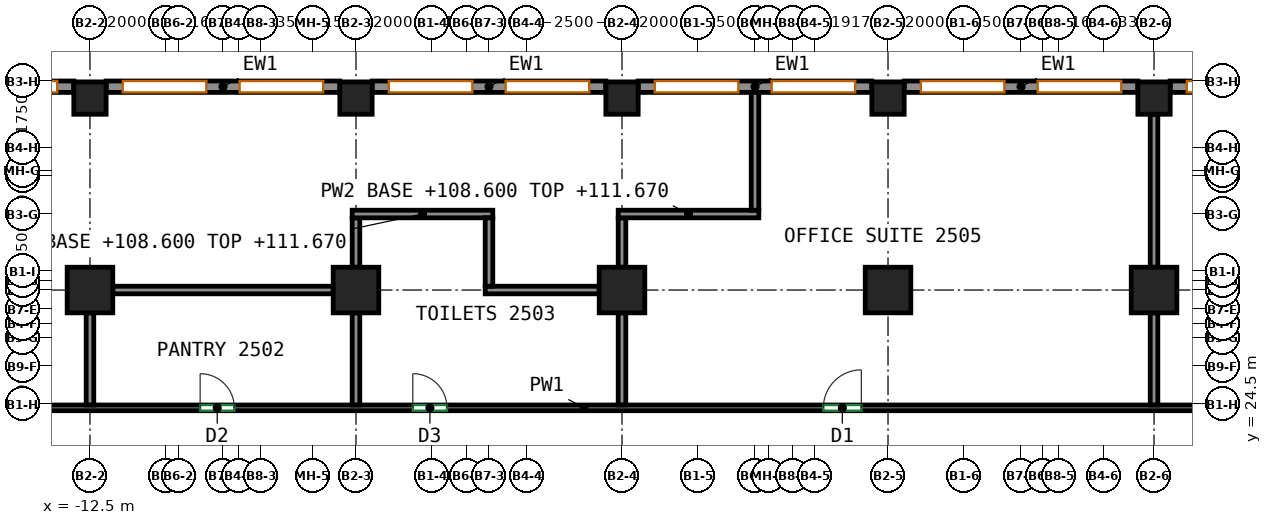
"""IFC4 building model, lengths in metres.
Left out: names, types, materials, properties, quantities, classifications, styles, units other than length and angle.
Written with IfcOpenShell. Run it as: python <this file> out.ifc"""

import sys

from ifc_helpers import new_model, si_unit, direction, frame, frame_2d, origin, origin_2d, place, context, subcontext, project, spatial, rectangle, extrude, source, transform, mapped, element, fill, save


model = new_model("IFC4")
c1 = context("Model", 3, precision=1e-05, world=origin(), true_north=direction((0.0, 1.0)))
c2 = subcontext(c1, "Body", "Model", "MODEL_VIEW")
j1 = project(units=[si_unit("LENGTHUNIT", "METRE"), si_unit("PLANEANGLEUNIT", "RADIAN")], contexts=[c1])
p1 = place(None, origin())
s1 = spatial("IfcSite", under=j1, at=p1, CompositionType="ELEMENT")
p2 = place(p1, origin())
s2 = spatial("IfcBuilding", under=s1, at=p2, CompositionType="ELEMENT")
p3 = place(p2, frame((0.0, 0.0, 108.6)))
s3 = spatial("IfcBuildingStorey", under=s2, at=p3, CompositionType="ELEMENT", Elevation=108.6)
m1 = source(origin(), c2, "Body", "SweptSolid", [
    extrude(rectangle(XDim=1.2, YDim=1.2, at=origin_2d()), origin(), (0.0, 0.0, 1.0), 3.72),
])
p4 = place(p3, frame((-12.5, 27.5, 0.0), z_axis=(0.0, 0.0, 1.0), x_axis=(1.0, 0.0, 0.0)))
e1 = element("IfcColumn", 1, at=p4, inside=s3, PredefinedType="COLUMN", context=c2, shape_type="MappedRepresentation", body=[
    mapped(m1, transform((0.0, 0.0, 0.0))),
])
m2 = source(origin(), c2, "Body", "SweptSolid", [
    extrude(rectangle(XDim=0.85, YDim=0.85, at=origin_2d()), origin(), (0.0, 0.0, 1.0), 3.72),
])
p5 = place(p3, frame((-12.5, 32.55, 0.0), z_axis=(0.0, 0.0, 1.0), x_axis=(1.0, 0.0, 0.0)))
e2 = element("IfcColumn", 2, at=p5, inside=s3, PredefinedType="COLUMN", context=c2, shape_type="MappedRepresentation", body=[
    mapped(m2, transform((0.0, 0.0, 0.0))),
])
p6 = place(p3, frame((-5.5, 27.5, 0.0), z_axis=(0.0, 0.0, 1.0), x_axis=(1.0, 0.0, 0.0)))
e3 = element("IfcColumn", 3, at=p6, inside=s3, PredefinedType="COLUMN", context=c2, shape_type="MappedRepresentation", body=[
    mapped(m1, transform((0.0, 0.0, 0.0))),
])
p7 = place(p3, frame((-5.5, 32.55, 0.0), z_axis=(0.0, 0.0, 1.0), x_axis=(1.0, 0.0, 0.0)))
e4 = element("IfcColumn", 4, at=p7, inside=s3, PredefinedType="COLUMN", context=c2, shape_type="MappedRepresentation", body=[
    mapped(m2, transform((0.0, 0.0, 0.0))),
])
p8 = place(p3, frame((1.5, 27.5, 0.0), z_axis=(0.0, 0.0, 1.0), x_axis=(1.0, 0.0, 0.0)))
e5 = element("IfcColumn", 5, at=p8, inside=s3, PredefinedType="COLUMN", context=c2, shape_type="MappedRepresentation", body=[
    mapped(m1, transform((0.0, 0.0, 0.0))),
])
p9 = place(p3, frame((1.5, 32.55, 0.0), z_axis=(0.0, 0.0, 1.0), x_axis=(1.0, 0.0, 0.0)))
e6 = element("IfcColumn", 6, at=p9, inside=s3, PredefinedType="COLUMN", context=c2, shape_type="MappedRepresentation", body=[
    mapped(m2, transform((0.0, 0.0, 0.0))),
])
p10 = place(p3, frame((8.5, 27.5, 0.0), z_axis=(0.0, 0.0, 1.0), x_axis=(1.0, 0.0, 0.0)))
e7 = element("IfcColumn", 7, at=p10, inside=s3, PredefinedType="COLUMN", context=c2, shape_type="MappedRepresentation", body=[
    mapped(m1, transform((0.0, 0.0, 0.0))),
])
p11 = place(p3, frame((8.5, 32.55, 0.0), z_axis=(0.0, 0.0, 1.0), x_axis=(1.0, 0.0, 0.0)))
e8 = element("IfcColumn", 8, at=p11, inside=s3, PredefinedType="COLUMN", context=c2, shape_type="MappedRepresentation", body=[
    mapped(m2, transform((0.0, 0.0, 0.0))),
])
p12 = place(p3, frame((15.5, 27.5, 0.0), z_axis=(0.0, 0.0, 1.0), x_axis=(1.0, 0.0, 0.0)))
e9 = element("IfcColumn", 9, at=p12, inside=s3, PredefinedType="COLUMN", context=c2, shape_type="MappedRepresentation", body=[
    mapped(m1, transform((0.0, 0.0, 0.0))),
])
p13 = place(p3, frame((15.5, 32.55, 0.0), z_axis=(0.0, 0.0, 1.0), x_axis=(1.0, 0.0, 0.0)))
e10 = element("IfcColumn", 10, at=p13, inside=s3, PredefinedType="COLUMN", context=c2, shape_type="MappedRepresentation", body=[
    mapped(m2, transform((0.0, 0.0, 0.0))),
])
m3 = source(origin(), c2, "Body", "SweptSolid", [
    extrude(rectangle(XDim=6.15, YDim=0.3, at=frame_2d((3.075, 0.0))), origin(), (0.0, 0.0, 1.0), 3.72),
])
p14 = place(p3, frame((22.075, 32.85, 0.0), z_axis=(0.0, 0.0, 1.0), x_axis=(-1.0, 0.0, 0.0)))
e11 = element("IfcWall", 11, at=p14, inside=s3, PredefinedType="SOLIDWALL", context=c2, shape_type="MappedRepresentation", body=[
    mapped(m3, transform((0.0, 0.0, 0.0))),
])
p15 = place(p14, frame((0.438, 0.0, 0.7)))
e12 = element("IfcOpeningElement", 12, at=p15, cuts=e11, PredefinedType="OPENING", context=c2, shape_type="SweptSolid", body=[
    extrude(rectangle(XDim=2.2, YDim=2.25, at=frame_2d((1.1, 1.125))), frame((0.0, 0.16, 0.0), z_axis=(0.0, -1.0, 0.0), x_axis=(1.0, 0.0, 0.0)), (0.0, 0.0, 1.0), 0.32),
])
p16 = place(p14, frame((3.512, 0.0, 0.7)))
e13 = element("IfcOpeningElement", 13, at=p16, cuts=e11, PredefinedType="OPENING", context=c2, shape_type="SweptSolid", body=[
    extrude(rectangle(XDim=2.2, YDim=2.25, at=frame_2d((1.1, 1.125))), frame((0.0, 0.16, 0.0), z_axis=(0.0, -1.0, 0.0), x_axis=(1.0, 0.0, 0.0)), (0.0, 0.0, 1.0), 0.32),
])
p17 = place(p3, frame((15.075, 32.85, 0.0), z_axis=(0.0, 0.0, 1.0), x_axis=(-1.0, 0.0, 0.0)))
e14 = element("IfcWall", 14, at=p17, inside=s3, PredefinedType="SOLIDWALL", context=c2, shape_type="MappedRepresentation", body=[
    mapped(m3, transform((0.0, 0.0, 0.0))),
])
p18 = place(p17, frame((0.438, 0.0, 0.7)))
e15 = element("IfcOpeningElement", 15, at=p18, cuts=e14, PredefinedType="OPENING", context=c2, shape_type="SweptSolid", body=[
    extrude(rectangle(XDim=2.2, YDim=2.25, at=frame_2d((1.1, 1.125))), frame((0.0, 0.16, 0.0), z_axis=(0.0, -1.0, 0.0), x_axis=(1.0, 0.0, 0.0)), (0.0, 0.0, 1.0), 0.32),
])
p19 = place(p17, frame((3.512, 0.0, 0.7)))
e16 = element("IfcOpeningElement", 16, at=p19, cuts=e14, PredefinedType="OPENING", context=c2, shape_type="SweptSolid", body=[
    extrude(rectangle(XDim=2.2, YDim=2.25, at=frame_2d((1.1, 1.125))), frame((0.0, 0.16, 0.0), z_axis=(0.0, -1.0, 0.0), x_axis=(1.0, 0.0, 0.0)), (0.0, 0.0, 1.0), 0.32),
])
p20 = place(p3, frame((8.075, 32.85, 0.0), z_axis=(0.0, 0.0, 1.0), x_axis=(-1.0, 0.0, 0.0)))
e17 = element("IfcWall", 17, at=p20, inside=s3, PredefinedType="SOLIDWALL", context=c2, shape_type="MappedRepresentation", body=[
    mapped(m3, transform((0.0, 0.0, 0.0))),
])
p21 = place(p20, frame((0.438, 0.0, 0.7)))
e18 = element("IfcOpeningElement", 18, at=p21, cuts=e17, PredefinedType="OPENING", context=c2, shape_type="SweptSolid", body=[
    extrude(rectangle(XDim=2.2, YDim=2.25, at=frame_2d((1.1, 1.125))), frame((0.0, 0.16, 0.0), z_axis=(0.0, -1.0, 0.0), x_axis=(1.0, 0.0, 0.0)), (0.0, 0.0, 1.0), 0.32),
])
p22 = place(p20, frame((3.512, 0.0, 0.7)))
e19 = element("IfcOpeningElement", 19, at=p22, cuts=e17, PredefinedType="OPENING", context=c2, shape_type="SweptSolid", body=[
    extrude(rectangle(XDim=2.2, YDim=2.25, at=frame_2d((1.1, 1.125))), frame((0.0, 0.16, 0.0), z_axis=(0.0, -1.0, 0.0), x_axis=(1.0, 0.0, 0.0)), (0.0, 0.0, 1.0), 0.32),
])
p23 = place(p3, frame((1.075, 32.85, 0.0), z_axis=(0.0, 0.0, 1.0), x_axis=(-1.0, 0.0, 0.0)))
e20 = element("IfcWall", 20, at=p23, inside=s3, PredefinedType="SOLIDWALL", context=c2, shape_type="MappedRepresentation", body=[
    mapped(m3, transform((0.0, 0.0, 0.0))),
])
p24 = place(p23, frame((0.438, 0.0, 0.7)))
e21 = element("IfcOpeningElement", 21, at=p24, cuts=e20, PredefinedType="OPENING", context=c2, shape_type="SweptSolid", body=[
    extrude(rectangle(XDim=2.2, YDim=2.25, at=frame_2d((1.1, 1.125))), frame((0.0, 0.16, 0.0), z_axis=(0.0, -1.0, 0.0), x_axis=(1.0, 0.0, 0.0)), (0.0, 0.0, 1.0), 0.32),
])
p25 = place(p23, frame((3.512, 0.0, 0.7)))
e22 = element("IfcOpeningElement", 22, at=p25, cuts=e20, PredefinedType="OPENING", context=c2, shape_type="SweptSolid", body=[
    extrude(rectangle(XDim=2.2, YDim=2.25, at=frame_2d((1.1, 1.125))), frame((0.0, 0.16, 0.0), z_axis=(0.0, -1.0, 0.0), x_axis=(1.0, 0.0, 0.0)), (0.0, 0.0, 1.0), 0.32),
])
p26 = place(p3, frame((-5.925, 32.85, 0.0), z_axis=(0.0, 0.0, 1.0), x_axis=(-1.0, 0.0, 0.0)))
e23 = element("IfcWall", 23, at=p26, inside=s3, PredefinedType="SOLIDWALL", context=c2, shape_type="MappedRepresentation", body=[
    mapped(m3, transform((0.0, 0.0, 0.0))),
])
p27 = place(p26, frame((0.438, 0.0, 0.7)))
e24 = element("IfcOpeningElement", 24, at=p27, cuts=e23, PredefinedType="OPENING", context=c2, shape_type="SweptSolid", body=[
    extrude(rectangle(XDim=2.2, YDim=2.25, at=frame_2d((1.1, 1.125))), frame((0.0, 0.16, 0.0), z_axis=(0.0, -1.0, 0.0), x_axis=(1.0, 0.0, 0.0)), (0.0, 0.0, 1.0), 0.32),
])
p28 = place(p26, frame((3.512, 0.0, 0.7)))
e25 = element("IfcOpeningElement", 25, at=p28, cuts=e23, PredefinedType="OPENING", context=c2, shape_type="SweptSolid", body=[
    extrude(rectangle(XDim=2.2, YDim=2.25, at=frame_2d((1.1, 1.125))), frame((0.0, 0.16, 0.0), z_axis=(0.0, -1.0, 0.0), x_axis=(1.0, 0.0, 0.0)), (0.0, 0.0, 1.0), 0.32),
])
p29 = place(p3, frame((-12.925, 32.85, 0.0), z_axis=(0.0, 0.0, 1.0), x_axis=(-1.0, 0.0, 0.0)))
e26 = element("IfcWall", 26, at=p29, inside=s3, PredefinedType="SOLIDWALL", context=c2, shape_type="MappedRepresentation", body=[
    mapped(m3, transform((0.0, 0.0, 0.0))),
])
p30 = place(p29, frame((0.438, 0.0, 0.7)))
e27 = element("IfcOpeningElement", 27, at=p30, cuts=e26, PredefinedType="OPENING", context=c2, shape_type="SweptSolid", body=[
    extrude(rectangle(XDim=2.2, YDim=2.25, at=frame_2d((1.1, 1.125))), frame((0.0, 0.16, 0.0), z_axis=(0.0, -1.0, 0.0), x_axis=(1.0, 0.0, 0.0)), (0.0, 0.0, 1.0), 0.32),
])
p31 = place(p29, frame((3.512, 0.0, 0.7)))
e28 = element("IfcOpeningElement", 28, at=p31, cuts=e26, PredefinedType="OPENING", context=c2, shape_type="SweptSolid", body=[
    extrude(rectangle(XDim=2.2, YDim=2.25, at=frame_2d((1.1, 1.125))), frame((0.0, 0.16, 0.0), z_axis=(0.0, -1.0, 0.0), x_axis=(1.0, 0.0, 0.0)), (0.0, 0.0, 1.0), 0.32),
])
p32 = place(p3, frame((-19.575, 24.4, 0.0), z_axis=(0.0, 0.0, 1.0), x_axis=(1.0, 0.0, 0.0)))
e29 = element("IfcWall", 29, at=p32, inside=s3, PredefinedType="PARTITIONING", context=c2, shape_type="SweptSolid", body=[
    extrude(rectangle(XDim=40.15, YDim=0.15, at=frame_2d((20.075, 0.0))), origin(), (0.0, 0.0, 1.0), 3.72),
])
p33 = place(p32, frame((9.974, 0.0, 0.0)))
e30 = element("IfcOpeningElement", 30, at=p33, cuts=e29, PredefinedType="OPENING", context=c2, shape_type="SweptSolid", body=[
    extrude(rectangle(XDim=0.9, YDim=2.1, at=frame_2d((0.45, 1.05))), frame((0.0, 0.085, 0.0), z_axis=(0.0, -1.0, 0.0), x_axis=(1.0, 0.0, 0.0)), (0.0, 0.0, 1.0), 0.17),
])
p34 = place(p32, frame((15.57, 0.0, 0.0)))
e31 = element("IfcOpeningElement", 31, at=p34, cuts=e29, PredefinedType="OPENING", context=c2, shape_type="SweptSolid", body=[
    extrude(rectangle(XDim=0.9, YDim=2.1, at=frame_2d((0.45, 1.05))), frame((0.0, 0.085, 0.0), z_axis=(0.0, -1.0, 0.0), x_axis=(1.0, 0.0, 0.0)), (0.0, 0.0, 1.0), 0.17),
])
p35 = place(p32, frame((26.373, 0.0, 0.0)))
e32 = element("IfcOpeningElement", 32, at=p35, cuts=e29, PredefinedType="OPENING", context=c2, shape_type="SweptSolid", body=[
    extrude(rectangle(XDim=1.0, YDim=2.1, at=frame_2d((0.5, 1.05))), frame((0.0, 0.085, 0.0), z_axis=(0.0, -1.0, 0.0), x_axis=(1.0, 0.0, 0.0)), (0.0, 0.0, 1.0), 0.17),
])
p36 = place(p32, frame((37.619, 0.0, 0.0)))
e33 = element("IfcOpeningElement", 33, at=p36, cuts=e29, PredefinedType="OPENING", context=c2, shape_type="SweptSolid", body=[
    extrude(rectangle(XDim=1.0, YDim=2.1, at=frame_2d((0.5, 1.05))), frame((0.0, 0.085, 0.0), z_axis=(0.0, -1.0, 0.0), x_axis=(1.0, 0.0, 0.0)), (0.0, 0.0, 1.0), 0.17),
])
p37 = place(p3, frame((15.5, 28.1, 0.0), z_axis=(0.0, 0.0, 1.0), x_axis=(0.0, 1.0, 0.0)))
e34 = element("IfcWall", 34, at=p37, inside=s3, PredefinedType="PARTITIONING", context=c2, shape_type="SweptSolid", body=[
    extrude(rectangle(XDim=4.025, YDim=0.2, at=frame_2d((2.012, 0.0))), origin(), (0.0, 0.0, 1.0), 3.72),
])
for number, where, z_axis, x_axis in (
    (35, (15.5, 24.476, 0.0), (0.0, 0.0, 1.0), (0.0, 1.0, 0.0)),
    (36, (1.5, 24.476, 0.0), (0.0, 0.0, 1.0), (0.0, 1.0, 0.0)),
):
    element("IfcWall", number, at=place(p3, frame(where, z_axis=z_axis, x_axis=x_axis)), inside=s3, PredefinedType="PARTITIONING", context=c2, shape_type="SweptSolid", body=[
        extrude(rectangle(XDim=2.424, YDim=0.2, at=frame_2d((1.212, 0.0))), origin(), (0.0, 0.0, 1.0), 3.72),
    ])
p38 = place(p3, frame((1.5, 28.1, 0.0), z_axis=(0.0, 0.0, 1.0), x_axis=(0.0, 1.0, 0.0)))
e37 = element("IfcWall", 37, at=p38, inside=s3, PredefinedType="PARTITIONING", context=c2, shape_type="SweptSolid", body=[
    extrude(rectangle(XDim=1.3, YDim=0.2, at=frame_2d((0.65, 0.0))), origin(), (0.0, 0.0, 1.0), 3.72),
])
p39 = place(p3, frame((1.4, 29.5, 0.0), z_axis=(0.0, 0.0, 1.0), x_axis=(1.0, 0.0, 0.0)))
e38 = element("IfcWall", 38, at=p39, inside=s3, PredefinedType="PARTITIONING", context=c2, shape_type="SweptSolid", body=[
    extrude(rectangle(XDim=3.7, YDim=0.2, at=frame_2d((1.85, 0.0))), origin(), (0.0, 0.0, 1.0), 3.07),
])
p40 = place(p3, frame((5.0, 29.6, 0.0), z_axis=(0.0, 0.0, 1.0), x_axis=(0.0, 1.0, 0.0)))
e39 = element("IfcWall", 39, at=p40, inside=s3, PredefinedType="PARTITIONING", context=c2, shape_type="SweptSolid", body=[
    extrude(rectangle(XDim=3.15, YDim=0.2, at=frame_2d((1.575, 0.0))), origin(), (0.0, 0.0, 1.0), 3.72),
])
p41 = place(p3, frame((-5.5, 24.476, 0.0), z_axis=(0.0, 0.0, 1.0), x_axis=(0.0, 1.0, 0.0)))
e40 = element("IfcWall", 40, at=p41, inside=s3, PredefinedType="PARTITIONING", context=c2, shape_type="SweptSolid", body=[
    extrude(rectangle(XDim=2.424, YDim=0.2, at=frame_2d((1.212, 0.0))), origin(), (0.0, 0.0, 1.0), 3.72),
])
p42 = place(p3, frame((-2.1, 27.5, 0.0), z_axis=(0.0, 0.0, 1.0), x_axis=(1.0, 0.0, 0.0)))
e41 = element("IfcWall", 41, at=p42, inside=s3, PredefinedType="PARTITIONING", context=c2, shape_type="SweptSolid", body=[
    extrude(rectangle(XDim=3.0, YDim=0.2, at=frame_2d((1.5, 0.0))), origin(), (0.0, 0.0, 1.0), 3.72),
])
p43 = place(p3, frame((-5.5, 28.1, 0.0), z_axis=(0.0, 0.0, 1.0), x_axis=(0.0, 1.0, 0.0)))
e42 = element("IfcWall", 42, at=p43, inside=s3, PredefinedType="PARTITIONING", context=c2, shape_type="SweptSolid", body=[
    extrude(rectangle(XDim=1.3, YDim=0.2, at=frame_2d((0.65, 0.0))), origin(), (0.0, 0.0, 1.0), 3.72),
])
p44 = place(p3, frame((-5.6, 29.5, 0.0), z_axis=(0.0, 0.0, 1.0), x_axis=(1.0, 0.0, 0.0)))
e43 = element("IfcWall", 43, at=p44, inside=s3, PredefinedType="PARTITIONING", context=c2, shape_type="SweptSolid", body=[
    extrude(rectangle(XDim=3.7, YDim=0.2, at=frame_2d((1.85, 0.0))), origin(), (0.0, 0.0, 1.0), 3.07),
])
p45 = place(p3, frame((-2.0, 27.6, 0.0), z_axis=(0.0, 0.0, 1.0), x_axis=(0.0, 1.0, 0.0)))
e44 = element("IfcWall", 44, at=p45, inside=s3, PredefinedType="PARTITIONING", context=c2, shape_type="SweptSolid", body=[
    extrude(rectangle(XDim=1.8, YDim=0.2, at=frame_2d((0.9, 0.0))), origin(), (0.0, 0.0, 1.0), 3.72),
])
p46 = place(p3, frame((-12.5, 26.9, 0.0), z_axis=(0.0, 0.0, 1.0), x_axis=(0.0, -1.0, 0.0)))
e45 = element("IfcWall", 45, at=p46, inside=s3, PredefinedType="PARTITIONING", context=c2, shape_type="SweptSolid", body=[
    extrude(rectangle(XDim=2.424, YDim=0.2, at=frame_2d((1.212, 0.0))), origin(), (0.0, 0.0, 1.0), 3.72),
])
p47 = place(p3, frame((-11.9, 27.5, 0.0), z_axis=(0.0, 0.0, 1.0), x_axis=(1.0, 0.0, 0.0)))
e46 = element("IfcWall", 46, at=p47, inside=s3, PredefinedType="PARTITIONING", context=c2, shape_type="SweptSolid", body=[
    extrude(rectangle(XDim=5.8, YDim=0.2, at=frame_2d((2.9, 0.0))), origin(), (0.0, 0.0, 1.0), 3.72),
])
p48 = place(p16, origin())
e47 = element("IfcWindow", 47, at=p48, inside=s3, PartitioningType="SINGLE_PANEL", PredefinedType="WINDOW", context=c2, shape_type="SweptSolid", body=[
    extrude(rectangle(XDim=2.2, YDim=2.25, at=frame_2d((1.1, 1.125))), frame((0.0, 0.03, 0.0), z_axis=(0.0, -1.0, 0.0), x_axis=(1.0, 0.0, 0.0)), (0.0, 0.0, 1.0), 0.06),
])
fill(e13, e47)
p49 = place(p18, origin())
e48 = element("IfcWindow", 48, at=p49, inside=s3, PartitioningType="SINGLE_PANEL", PredefinedType="WINDOW", context=c2, shape_type="SweptSolid", body=[
    extrude(rectangle(XDim=2.2, YDim=2.25, at=frame_2d((1.1, 1.125))), frame((0.0, 0.03, 0.0), z_axis=(0.0, -1.0, 0.0), x_axis=(1.0, 0.0, 0.0)), (0.0, 0.0, 1.0), 0.06),
])
fill(e15, e48)
p50 = place(p19, origin())
e49 = element("IfcWindow", 49, at=p50, inside=s3, PartitioningType="SINGLE_PANEL", PredefinedType="WINDOW", context=c2, shape_type="SweptSolid", body=[
    extrude(rectangle(XDim=2.2, YDim=2.25, at=frame_2d((1.1, 1.125))), frame((0.0, 0.03, 0.0), z_axis=(0.0, -1.0, 0.0), x_axis=(1.0, 0.0, 0.0)), (0.0, 0.0, 1.0), 0.06),
])
fill(e16, e49)
p51 = place(p21, origin())
e50 = element("IfcWindow", 50, at=p51, inside=s3, PartitioningType="SINGLE_PANEL", PredefinedType="WINDOW", context=c2, shape_type="SweptSolid", body=[
    extrude(rectangle(XDim=2.2, YDim=2.25, at=frame_2d((1.1, 1.125))), frame((0.0, 0.03, 0.0), z_axis=(0.0, -1.0, 0.0), x_axis=(1.0, 0.0, 0.0)), (0.0, 0.0, 1.0), 0.06),
])
fill(e18, e50)
p52 = place(p22, origin())
e51 = element("IfcWindow", 51, at=p52, inside=s3, PartitioningType="SINGLE_PANEL", PredefinedType="WINDOW", context=c2, shape_type="SweptSolid", body=[
    extrude(rectangle(XDim=2.2, YDim=2.25, at=frame_2d((1.1, 1.125))), frame((0.0, 0.03, 0.0), z_axis=(0.0, -1.0, 0.0), x_axis=(1.0, 0.0, 0.0)), (0.0, 0.0, 1.0), 0.06),
])
fill(e19, e51)
p53 = place(p24, origin())
e52 = element("IfcWindow", 52, at=p53, inside=s3, PartitioningType="SINGLE_PANEL", PredefinedType="WINDOW", context=c2, shape_type="SweptSolid", body=[
    extrude(rectangle(XDim=2.2, YDim=2.25, at=frame_2d((1.1, 1.125))), frame((0.0, 0.03, 0.0), z_axis=(0.0, -1.0, 0.0), x_axis=(1.0, 0.0, 0.0)), (0.0, 0.0, 1.0), 0.06),
])
fill(e21, e52)
p54 = place(p25, origin())
e53 = element("IfcWindow", 53, at=p54, inside=s3, PartitioningType="SINGLE_PANEL", PredefinedType="WINDOW", context=c2, shape_type="SweptSolid", body=[
    extrude(rectangle(XDim=2.2, YDim=2.25, at=frame_2d((1.1, 1.125))), frame((0.0, 0.03, 0.0), z_axis=(0.0, -1.0, 0.0), x_axis=(1.0, 0.0, 0.0)), (0.0, 0.0, 1.0), 0.06),
])
fill(e22, e53)
p55 = place(p27, origin())
e54 = element("IfcWindow", 54, at=p55, inside=s3, PartitioningType="SINGLE_PANEL", PredefinedType="WINDOW", context=c2, shape_type="SweptSolid", body=[
    extrude(rectangle(XDim=2.2, YDim=2.25, at=frame_2d((1.1, 1.125))), frame((0.0, 0.03, 0.0), z_axis=(0.0, -1.0, 0.0), x_axis=(1.0, 0.0, 0.0)), (0.0, 0.0, 1.0), 0.06),
])
fill(e24, e54)
p56 = place(p28, origin())
e55 = element("IfcWindow", 55, at=p56, inside=s3, PartitioningType="SINGLE_PANEL", PredefinedType="WINDOW", context=c2, shape_type="SweptSolid", body=[
    extrude(rectangle(XDim=2.2, YDim=2.25, at=frame_2d((1.1, 1.125))), frame((0.0, 0.03, 0.0), z_axis=(0.0, -1.0, 0.0), x_axis=(1.0, 0.0, 0.0)), (0.0, 0.0, 1.0), 0.06),
])
fill(e25, e55)
p57 = place(p30, origin())
e56 = element("IfcWindow", 56, at=p57, inside=s3, PartitioningType="SINGLE_PANEL", PredefinedType="WINDOW", context=c2, shape_type="SweptSolid", body=[
    extrude(rectangle(XDim=2.2, YDim=2.25, at=frame_2d((1.1, 1.125))), frame((0.0, 0.03, 0.0), z_axis=(0.0, -1.0, 0.0), x_axis=(1.0, 0.0, 0.0)), (0.0, 0.0, 1.0), 0.06),
])
fill(e27, e56)
p58 = place(p33, origin())
e57 = element("IfcDoor", 57, at=p58, inside=s3, OperationType="SINGLE_SWING_LEFT", PredefinedType="DOOR", context=c2, shape_type="SweptSolid", body=[
    extrude(rectangle(XDim=0.9, YDim=2.1, at=frame_2d((0.45, 1.05))), frame((0.0, 0.025, 0.0), z_axis=(0.0, -1.0, 0.0), x_axis=(1.0, 0.0, 0.0)), (0.0, 0.0, 1.0), 0.05),
])
fill(e30, e57)
p59 = place(p34, origin())
e58 = element("IfcDoor", 58, at=p59, inside=s3, OperationType="SINGLE_SWING_LEFT", PredefinedType="DOOR", context=c2, shape_type="SweptSolid", body=[
    extrude(rectangle(XDim=0.9, YDim=2.1, at=frame_2d((0.45, 1.05))), frame((0.0, 0.025, 0.0), z_axis=(0.0, -1.0, 0.0), x_axis=(1.0, 0.0, 0.0)), (0.0, 0.0, 1.0), 0.05),
])
fill(e31, e58)
p60 = place(p35, origin())
e59 = element("IfcDoor", 59, at=p60, inside=s3, OperationType="SINGLE_SWING_RIGHT", PredefinedType="DOOR", context=c2, shape_type="SweptSolid", body=[
    extrude(rectangle(XDim=1.0, YDim=2.1, at=frame_2d((0.5, 1.05))), frame((0.0, 0.025, 0.0), z_axis=(0.0, -1.0, 0.0), x_axis=(1.0, 0.0, 0.0)), (0.0, 0.0, 1.0), 0.05),
])
fill(e32, e59)
save(model, sys.argv[1])
